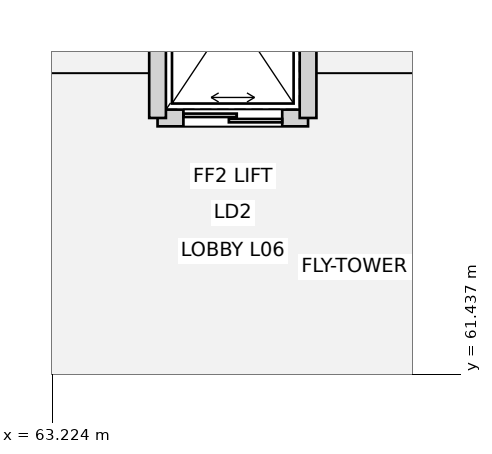
"""IFC4 building model, lengths in metres.
Left out: names, types, materials, properties, quantities, classifications, styles, units other than length and angle.
Written with IfcOpenShell. Run it as: python <this file> out.ifc"""

import sys

from ifc_helpers import new_model, si_unit, direction, frame, frame_2d, origin, place, context, subcontext, project, spatial, rectangle, extrude, element, fill, save


model = new_model("IFC4")
c1 = context("Model", 3, precision=1e-05, world=origin(), true_north=direction((0.0, 1.0)))
c2 = subcontext(c1, "Body", "Model", "MODEL_VIEW")
j1 = project(units=[si_unit("LENGTHUNIT", "METRE"), si_unit("PLANEANGLEUNIT", "RADIAN")], contexts=[c1])
p1 = place(None, origin())
s1 = spatial("IfcSite", under=j1, at=p1, CompositionType="ELEMENT")
p2 = place(p1, origin())
s2 = spatial("IfcBuilding", under=s1, at=p2, CompositionType="ELEMENT")
p3 = place(p2, frame((0.0, 0.0, 30.6)))
s3 = spatial("IfcBuildingStorey", under=s2, at=p3, CompositionType="ELEMENT", Elevation=30.6)
p4 = place(p3, frame((64.61, 64.81, 0.0), z_axis=(0.0, 0.0, 1.0), x_axis=(1.0, 0.0, 0.0)))
e1 = element("IfcWall", 1, at=p4, inside=s3, PredefinedType="PARTITIONING", context=c2, shape_type="SweptSolid", body=[
    extrude(rectangle(XDim=1.98, YDim=0.22, at=frame_2d((0.99, 0.0))), origin(), (0.0, 0.0, 1.0), 3.765),
])
p5 = place(p4, frame((0.34, 0.0, 0.0)))
e2 = element("IfcOpeningElement", 2, at=p5, cuts=e1, PredefinedType="OPENING", context=c2, shape_type="SweptSolid", body=[
    extrude(rectangle(XDim=1.3, YDim=2.2, at=frame_2d((0.65, 1.1))), frame((0.0, 0.12, 0.0), z_axis=(0.0, -1.0, 0.0), x_axis=(1.0, 0.0, 0.0)), (0.0, 0.0, 1.0), 0.24),
])
for number, where, z_axis, x_axis in (
    (3, (64.61, 64.81, 0.0), (0.0, 0.0, 1.0), (0.0, 1.0, 0.0)),
    (4, (66.59, 64.81, 0.0), (0.0, 0.0, 1.0), (0.0, 1.0, 0.0)),
):
    element("IfcWall", number, at=place(p3, frame(where, z_axis=z_axis, x_axis=x_axis)), inside=s3, PredefinedType="PARTITIONING", context=c2, shape_type="SweptSolid", body=[
        extrude(rectangle(XDim=2.78, YDim=0.22, at=frame_2d((1.39, 0.0))), origin(), (0.0, 0.0, 1.0), 2.755),
    ])
p6 = place(p5, origin())
e5 = element("IfcDoor", 5, at=p6, inside=s3, OperationType="DOUBLE_DOOR_SLIDING", PredefinedType="DOOR", context=c2, shape_type="SweptSolid", body=[
    extrude(rectangle(XDim=1.3, YDim=2.2, at=frame_2d((0.65, 1.1))), frame((0.0, 0.025, 0.0), z_axis=(0.0, -1.0, 0.0), x_axis=(1.0, 0.0, 0.0)), (0.0, 0.0, 1.0), 0.05),
])
fill(e2, e5)
save(model, sys.argv[1])
